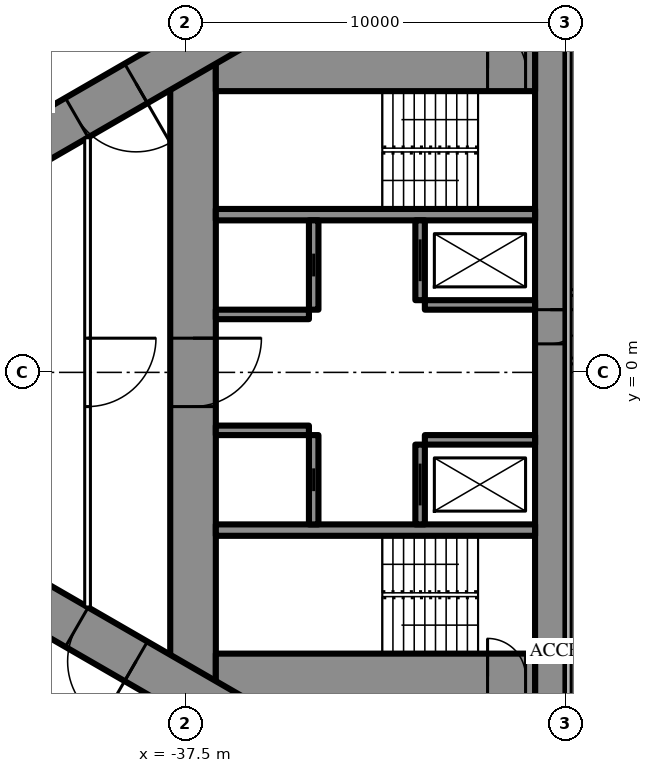
"""IFC4 building model, lengths in metres.
Left out: names, types, materials, properties, quantities, classifications, styles, units other than length and angle.
Written with IfcOpenShell. Run it as: python <this file> out.ifc"""

import sys

from ifc_helpers import new_model, si_unit, direction, frame, frame_2d, origin, place, context, subcontext, project, spatial, rectangle, extrude, element, fill, save


model = new_model("IFC4")
c1 = context("Model", 3, precision=1e-05, world=origin(), true_north=direction((0.0, 1.0)))
c2 = subcontext(c1, "Body", "Model", "MODEL_VIEW")
j1 = project(units=[si_unit("LENGTHUNIT", "METRE"), si_unit("PLANEANGLEUNIT", "RADIAN")], contexts=[c1])
p1 = place(None, origin())
s1 = spatial("IfcSite", under=j1, at=p1, CompositionType="ELEMENT")
p2 = place(p1, origin())
s2 = spatial("IfcBuilding", under=s1, at=p2, CompositionType="ELEMENT")
p3 = place(p2, frame((0.0, 0.0, 236.9)))
s3 = spatial("IfcBuildingStorey", under=s2, at=p3, CompositionType="ELEMENT", Elevation=236.9)
p4 = place(p3, frame((-27.9, 8.6, 0.0), z_axis=(0.0, 0.0, 1.0), x_axis=(0.0, -1.0, 0.0)))
e1 = element("IfcWall", 1, at=p4, inside=s3, PredefinedType="SHEAR", context=c2, shape_type="SweptSolid", body=[
    extrude(rectangle(XDim=17.2, YDim=0.8, at=frame_2d((8.6, 0.0))), origin(), (0.0, 0.0, 1.0), 3.6),
])
p5 = place(p4, frame((6.95, 0.0, 0.0)))
e2 = element("IfcOpeningElement", 2, at=p5, cuts=e1, PredefinedType="OPENING", context=c2, shape_type="SweptSolid", body=[
    extrude(rectangle(XDim=0.9, YDim=2.2, at=frame_2d((0.45, 1.1))), frame((0.0, 0.41, 0.0), z_axis=(0.0, -1.0, 0.0), x_axis=(1.0, 0.0, 0.0)), (0.0, 0.0, 1.0), 0.82),
])
p6 = place(p3, frame((-37.3, 8.6, 0.0), z_axis=(0.0, 0.0, 1.0), x_axis=(0.0, -1.0, 0.0)))
e3 = element("IfcWall", 3, at=p6, inside=s3, PredefinedType="SHEAR", context=c2, shape_type="SweptSolid", body=[
    extrude(rectangle(XDim=17.2, YDim=1.2, at=frame_2d((8.6, 0.0))), origin(), (0.0, 0.0, 1.0), 3.6),
])
p7 = place(p6, frame((7.7, 0.0, 0.0)))
e4 = element("IfcOpeningElement", 4, at=p7, cuts=e3, PredefinedType="OPENING", context=c2, shape_type="SweptSolid", body=[
    extrude(rectangle(XDim=1.8, YDim=2.2, at=frame_2d((0.9, 1.1))), frame((0.0, 0.61, 0.0), z_axis=(0.0, -1.0, 0.0), x_axis=(1.0, 0.0, 0.0)), (0.0, 0.0, 1.0), 1.22),
])
p8 = place(p3, frame((-28.3, 8.0, 0.0), z_axis=(0.0, 0.0, 1.0), x_axis=(-1.0, 0.0, 0.0)))
e5 = element("IfcWall", 5, at=p8, inside=s3, PredefinedType="SHEAR", context=c2, shape_type="SweptSolid", body=[
    extrude(rectangle(XDim=8.4, YDim=1.2, at=frame_2d((4.2, 0.0))), origin(), (0.0, 0.0, 1.0), 3.6),
])
p9 = place(p8, frame((0.25, 0.0, 0.0)))
e6 = element("IfcOpeningElement", 6, at=p9, cuts=e5, PredefinedType="OPENING", context=c2, shape_type="SweptSolid", body=[
    extrude(rectangle(XDim=1.0, YDim=2.2, at=frame_2d((0.5, 1.1))), frame((0.0, 0.61, 0.0), z_axis=(0.0, -1.0, 0.0), x_axis=(1.0, 0.0, 0.0)), (0.0, 0.0, 1.0), 1.22),
])
p10 = place(p3, frame((-28.3, -8.0, 0.0), z_axis=(0.0, 0.0, 1.0), x_axis=(-1.0, 0.0, 0.0)))
e7 = element("IfcWall", 7, at=p10, inside=s3, PredefinedType="SHEAR", context=c2, shape_type="SweptSolid", body=[
    extrude(rectangle(XDim=8.4, YDim=1.2, at=frame_2d((4.2, 0.0))), origin(), (0.0, 0.0, 1.0), 3.6),
])
p11 = place(p10, frame((0.25, 0.0, 0.0)))
e8 = element("IfcOpeningElement", 8, at=p11, cuts=e7, PredefinedType="OPENING", context=c2, shape_type="SweptSolid", body=[
    extrude(rectangle(XDim=1.0, YDim=2.2, at=frame_2d((0.5, 1.1))), frame((0.0, 0.61, 0.0), z_axis=(0.0, -1.0, 0.0), x_axis=(1.0, 0.0, 0.0)), (0.0, 0.0, 1.0), 1.22),
])
for number, where, z_axis, x_axis in (
    (9, (-28.3, 4.15, 0.0), (0.0, 0.0, 1.0), (-1.0, 0.0, 0.0)),
    (10, (-28.3, -4.15, 0.0), (0.0, 0.0, 1.0), (-1.0, 0.0, 0.0)),
):
    element("IfcWall", number, at=place(p3, frame(where, z_axis=z_axis, x_axis=x_axis)), inside=s3, PredefinedType="SHEAR", context=c2, shape_type="SweptSolid", body=[
        extrude(rectangle(XDim=8.4, YDim=0.3, at=frame_2d((4.2, 0.0))), origin(), (0.0, 0.0, 1.0), 3.6),
    ])
p12 = place(p3, frame((-31.325, 4.0, 0.0), z_axis=(0.0, 0.0, 1.0), x_axis=(0.0, -1.0, 0.0)))
e11 = element("IfcWall", 11, at=p12, inside=s3, PredefinedType="SHEAR", context=c2, shape_type="SweptSolid", body=[
    extrude(rectangle(XDim=2.1, YDim=0.25, at=frame_2d((1.05, 0.0))), origin(), (0.0, 0.0, 1.0), 3.6),
])
p13 = place(p12, frame((0.5, 0.0, 0.0)))
e12 = element("IfcOpeningElement", 12, at=p13, cuts=e11, PredefinedType="OPENING", context=c2, shape_type="SweptSolid", body=[
    extrude(rectangle(XDim=1.1, YDim=2.2, at=frame_2d((0.55, 1.1))), frame((0.0, 0.135, 0.0), z_axis=(0.0, -1.0, 0.0), x_axis=(1.0, 0.0, 0.0)), (0.0, 0.0, 1.0), 0.27),
])
p14 = place(p3, frame((-34.125, 4.0, 0.0), z_axis=(0.0, 0.0, 1.0), x_axis=(0.0, -1.0, 0.0)))
e13 = element("IfcWall", 13, at=p14, inside=s3, PredefinedType="SHEAR", context=c2, shape_type="SweptSolid", body=[
    extrude(rectangle(XDim=2.35, YDim=0.25, at=frame_2d((1.175, 0.0))), origin(), (0.0, 0.0, 1.0), 3.6),
])
p15 = place(p14, frame((0.875, 0.0, 0.0)))
e14 = element("IfcOpeningElement", 14, at=p15, cuts=e13, PredefinedType="OPENING", context=c2, shape_type="SweptSolid", body=[
    extrude(rectangle(XDim=0.6, YDim=2.0, at=frame_2d((0.3, 1.0))), frame((0.0, 0.135, 0.0), z_axis=(0.0, -1.0, 0.0), x_axis=(1.0, 0.0, 0.0)), (0.0, 0.0, 1.0), 0.27),
])
p16 = place(p3, frame((-28.3, 1.775, 0.0), z_axis=(0.0, 0.0, 1.0), x_axis=(-1.0, 0.0, 0.0)))
e15 = element("IfcWall", 15, at=p16, inside=s3, PredefinedType="SHEAR", context=c2, shape_type="SweptSolid", body=[
    extrude(rectangle(XDim=2.9, YDim=0.25, at=frame_2d((1.45, 0.0))), origin(), (0.0, 0.0, 1.0), 3.6),
])
p17 = place(p3, frame((-34.25, 1.525, 0.0), z_axis=(0.0, 0.0, 1.0), x_axis=(-1.0, 0.0, 0.0)))
e16 = element("IfcWall", 16, at=p17, inside=s3, PredefinedType="SHEAR", context=c2, shape_type="SweptSolid", body=[
    extrude(rectangle(XDim=2.45, YDim=0.25, at=frame_2d((1.225, 0.0))), origin(), (0.0, 0.0, 1.0), 3.6),
])
p18 = place(p3, frame((-31.325, -1.9, 0.0), z_axis=(0.0, 0.0, 1.0), x_axis=(0.0, -1.0, 0.0)))
e17 = element("IfcWall", 17, at=p18, inside=s3, PredefinedType="SHEAR", context=c2, shape_type="SweptSolid", body=[
    extrude(rectangle(XDim=2.1, YDim=0.25, at=frame_2d((1.05, 0.0))), origin(), (0.0, 0.0, 1.0), 3.6),
])
p19 = place(p18, frame((0.5, 0.0, 0.0)))
e18 = element("IfcOpeningElement", 18, at=p19, cuts=e17, PredefinedType="OPENING", context=c2, shape_type="SweptSolid", body=[
    extrude(rectangle(XDim=1.1, YDim=2.2, at=frame_2d((0.55, 1.1))), frame((0.0, 0.135, 0.0), z_axis=(0.0, -1.0, 0.0), x_axis=(1.0, 0.0, 0.0)), (0.0, 0.0, 1.0), 0.27),
])
p20 = place(p3, frame((-34.125, -1.65, 0.0), z_axis=(0.0, 0.0, 1.0), x_axis=(0.0, -1.0, 0.0)))
e19 = element("IfcWall", 19, at=p20, inside=s3, PredefinedType="SHEAR", context=c2, shape_type="SweptSolid", body=[
    extrude(rectangle(XDim=2.35, YDim=0.25, at=frame_2d((1.175, 0.0))), origin(), (0.0, 0.0, 1.0), 3.6),
])
p21 = place(p20, frame((0.875, 0.0, 0.0)))
e20 = element("IfcOpeningElement", 20, at=p21, cuts=e19, PredefinedType="OPENING", context=c2, shape_type="SweptSolid", body=[
    extrude(rectangle(XDim=0.6, YDim=2.0, at=frame_2d((0.3, 1.0))), frame((0.0, 0.135, 0.0), z_axis=(0.0, -1.0, 0.0), x_axis=(1.0, 0.0, 0.0)), (0.0, 0.0, 1.0), 0.27),
])
p22 = place(p3, frame((-28.3, -1.775, 0.0), z_axis=(0.0, 0.0, 1.0), x_axis=(-1.0, 0.0, 0.0)))
e21 = element("IfcWall", 21, at=p22, inside=s3, PredefinedType="SHEAR", context=c2, shape_type="SweptSolid", body=[
    extrude(rectangle(XDim=2.9, YDim=0.25, at=frame_2d((1.45, 0.0))), origin(), (0.0, 0.0, 1.0), 3.6),
])
p23 = place(p3, frame((-34.25, -1.525, 0.0), z_axis=(0.0, 0.0, 1.0), x_axis=(-1.0, 0.0, 0.0)))
e22 = element("IfcWall", 22, at=p23, inside=s3, PredefinedType="SHEAR", context=c2, shape_type="SweptSolid", body=[
    extrude(rectangle(XDim=2.45, YDim=0.25, at=frame_2d((1.225, 0.0))), origin(), (0.0, 0.0, 1.0), 3.6),
])
p24 = place(p3, frame((-27.2, 14.3, 0.0), z_axis=(0.0, 0.0, 1.0), x_axis=(-0.866026593062, -0.499997940104, 0.0)))
e23 = element("IfcWall", 23, at=p24, inside=s3, PredefinedType="SHEAR", context=c2, shape_type="SweptSolid", body=[
    extrude(rectangle(XDim=28.946, YDim=1.2, at=frame_2d((14.473, 0.0))), origin(), (0.0, 0.0, 1.0), 3.6),
])
p25 = place(p24, frame((4.6, 0.0, 0.0)))
e24 = element("IfcOpeningElement", 24, at=p25, cuts=e23, PredefinedType="OPENING", context=c2, shape_type="SweptSolid", body=[
    extrude(rectangle(XDim=1.0, YDim=2.2, at=frame_2d((0.5, 1.1))), frame((0.0, 0.61, 0.0), z_axis=(0.0, -1.0, 0.0), x_axis=(1.0, 0.0, 0.0)), (0.0, 0.0, 1.0), 1.22),
])
p26 = place(p24, frame((13.395, 0.0, 0.0)))
e25 = element("IfcOpeningElement", 25, at=p26, cuts=e23, PredefinedType="OPENING", context=c2, shape_type="SweptSolid", body=[
    extrude(rectangle(XDim=1.8, YDim=2.2, at=frame_2d((0.9, 1.1))), frame((0.0, 0.61, 0.0), z_axis=(0.0, -1.0, 0.0), x_axis=(1.0, 0.0, 0.0)), (0.0, 0.0, 1.0), 1.22),
])
p27 = place(p3, frame((-27.2, -14.3, 0.0), z_axis=(0.0, 0.0, 1.0), x_axis=(-0.866024021859, 0.500002393557, 0.0)))
e26 = element("IfcWall", 26, at=p27, inside=s3, PredefinedType="SHEAR", context=c2, shape_type="SweptSolid", body=[
    extrude(rectangle(XDim=27.907, YDim=1.2, at=frame_2d((13.954, 0.0))), origin(), (0.0, 0.0, 1.0), 3.6),
])
p28 = place(p27, frame((4.6, 0.0, 0.0)))
e27 = element("IfcOpeningElement", 27, at=p28, cuts=e26, PredefinedType="OPENING", context=c2, shape_type="SweptSolid", body=[
    extrude(rectangle(XDim=1.0, YDim=2.2, at=frame_2d((0.5, 1.1))), frame((0.0, 0.61, 0.0), z_axis=(0.0, -1.0, 0.0), x_axis=(1.0, 0.0, 0.0)), (0.0, 0.0, 1.0), 1.22),
])
p29 = place(p27, frame((13.395, 0.0, 0.0)))
e28 = element("IfcOpeningElement", 28, at=p29, cuts=e26, PredefinedType="OPENING", context=c2, shape_type="SweptSolid", body=[
    extrude(rectangle(XDim=1.8, YDim=2.2, at=frame_2d((0.9, 1.1))), frame((0.0, 0.61, 0.0), z_axis=(0.0, -1.0, 0.0), x_axis=(1.0, 0.0, 0.0)), (0.0, 0.0, 1.0), 1.22),
])
p30 = place(p3, frame((-28.737, 16.068, 0.0), z_axis=(0.0, 0.0, 1.0), x_axis=(-0.866026057212, -0.499998868229, 0.0)))
e29 = element("IfcWall", 29, at=p30, inside=s3, PredefinedType="PARTITIONING", context=c2, shape_type="SweptSolid", body=[
    extrude(rectangle(XDim=32.137, YDim=0.2, at=frame_2d((16.068, 0.0))), origin(), (0.0, 0.0, 1.0), 3.35),
])
p31 = place(p30, frame((1.08, 0.0, 0.0)))
e30 = element("IfcOpeningElement", 30, at=p31, cuts=e29, PredefinedType="OPENING", context=c2, shape_type="SweptSolid", body=[
    extrude(rectangle(XDim=1.8, YDim=2.03, at=frame_2d((0.9, 1.015))), frame((0.0, 0.11, 0.0), z_axis=(0.0, -1.0, 0.0), x_axis=(1.0, 0.0, 0.0)), (0.0, 0.0, 1.0), 0.22),
])
p32 = place(p30, frame((6.86, 0.0, 0.0)))
e31 = element("IfcOpeningElement", 31, at=p32, cuts=e29, PredefinedType="OPENING", context=c2, shape_type="SweptSolid", body=[
    extrude(rectangle(XDim=1.0, YDim=2.2, at=frame_2d((0.5, 1.1))), frame((0.0, 0.11, 0.0), z_axis=(0.0, -1.0, 0.0), x_axis=(1.0, 0.0, 0.0)), (0.0, 0.0, 1.0), 0.22),
])
p33 = place(p30, frame((16.418, 0.0, 0.0)))
e32 = element("IfcOpeningElement", 32, at=p33, cuts=e29, PredefinedType="OPENING", context=c2, shape_type="SweptSolid", body=[
    extrude(rectangle(XDim=0.95, YDim=2.2, at=frame_2d((0.475, 1.1))), frame((0.0, 0.11, 0.0), z_axis=(0.0, -1.0, 0.0), x_axis=(1.0, 0.0, 0.0)), (0.0, 0.0, 1.0), 0.22),
])
p34 = place(p30, frame((20.567, 0.0, 0.0)))
e33 = element("IfcOpeningElement", 33, at=p34, cuts=e29, PredefinedType="OPENING", context=c2, shape_type="SweptSolid", body=[
    extrude(rectangle(XDim=0.95, YDim=2.2, at=frame_2d((0.475, 1.1))), frame((0.0, 0.11, 0.0), z_axis=(0.0, -1.0, 0.0), x_axis=(1.0, 0.0, 0.0)), (0.0, 0.0, 1.0), 0.22),
])
p35 = place(p30, frame((27.065, 0.0, 0.0)))
e34 = element("IfcOpeningElement", 34, at=p35, cuts=e29, PredefinedType="OPENING", context=c2, shape_type="SweptSolid", body=[
    extrude(rectangle(XDim=0.95, YDim=2.2, at=frame_2d((0.475, 1.1))), frame((0.0, 0.11, 0.0), z_axis=(0.0, -1.0, 0.0), x_axis=(1.0, 0.0, 0.0)), (0.0, 0.0, 1.0), 0.22),
])
p36 = place(p3, frame((-40.075, 6.174, 0.0), z_axis=(0.0, 0.0, 1.0), x_axis=(0.0, -1.0, 0.0)))
e35 = element("IfcWall", 35, at=p36, inside=s3, PredefinedType="PARTITIONING", context=c2, shape_type="SweptSolid", body=[
    extrude(rectangle(XDim=12.348, YDim=0.15, at=frame_2d((6.174, 0.0))), origin(), (0.0, 0.0, 1.0), 3.35),
])
p37 = place(p36, frame((5.274, 0.0, 0.0)))
e36 = element("IfcOpeningElement", 36, at=p37, cuts=e35, PredefinedType="OPENING", context=c2, shape_type="SweptSolid", body=[
    extrude(rectangle(XDim=1.8, YDim=2.2, at=frame_2d((0.9, 1.1))), frame((0.0, 0.085, 0.0), z_axis=(0.0, -1.0, 0.0), x_axis=(1.0, 0.0, 0.0)), (0.0, 0.0, 1.0), 0.17),
])
p38 = place(p3, frame((-27.5, 0.3, 0.0), z_axis=(0.0, 0.0, 1.0), x_axis=(1.0, 0.0, 0.0)))
e37 = element("IfcWall", 37, at=p38, inside=s3, PredefinedType="PARTITIONING", context=c2, shape_type="SweptSolid", body=[
    extrude(rectangle(XDim=55.0, YDim=0.15, at=frame_2d((27.5, 0.0))), origin(), (0.0, 0.0, 1.0), 2.4),
])
p39 = place(p38, frame((1.575, 0.0, 0.0)))
e38 = element("IfcOpeningElement", 38, at=p39, cuts=e37, PredefinedType="OPENING", context=c2, shape_type="SweptSolid", body=[
    extrude(rectangle(XDim=1.0, YDim=2.2, at=frame_2d((0.5, 1.1))), frame((0.0, 0.085, 0.0), z_axis=(0.0, -1.0, 0.0), x_axis=(1.0, 0.0, 0.0)), (0.0, 0.0, 1.0), 0.17),
])
p40 = place(p38, frame((8.525, 0.0, 0.0)))
e39 = element("IfcOpeningElement", 39, at=p40, cuts=e37, PredefinedType="OPENING", context=c2, shape_type="SweptSolid", body=[
    extrude(rectangle(XDim=1.05, YDim=2.4, at=frame_2d((0.525, 1.2))), frame((0.0, 0.085, 0.0), z_axis=(0.0, -1.0, 0.0), x_axis=(1.0, 0.0, 0.0)), (0.0, 0.0, 1.0), 0.17),
])
p41 = place(p38, frame((14.025, 0.0, 0.0)))
e40 = element("IfcOpeningElement", 40, at=p41, cuts=e37, PredefinedType="OPENING", context=c2, shape_type="SweptSolid", body=[
    extrude(rectangle(XDim=1.05, YDim=2.4, at=frame_2d((0.525, 1.2))), frame((0.0, 0.085, 0.0), z_axis=(0.0, -1.0, 0.0), x_axis=(1.0, 0.0, 0.0)), (0.0, 0.0, 1.0), 0.17),
])
p42 = place(p38, frame((25.025, 0.0, 0.0)))
e41 = element("IfcOpeningElement", 41, at=p42, cuts=e37, PredefinedType="OPENING", context=c2, shape_type="SweptSolid", body=[
    extrude(rectangle(XDim=1.05, YDim=2.4, at=frame_2d((0.525, 1.2))), frame((0.0, 0.085, 0.0), z_axis=(0.0, -1.0, 0.0), x_axis=(1.0, 0.0, 0.0)), (0.0, 0.0, 1.0), 0.17),
])
p43 = place(p38, frame((30.525, 0.0, 0.0)))
e42 = element("IfcOpeningElement", 42, at=p43, cuts=e37, PredefinedType="OPENING", context=c2, shape_type="SweptSolid", body=[
    extrude(rectangle(XDim=1.05, YDim=2.4, at=frame_2d((0.525, 1.2))), frame((0.0, 0.085, 0.0), z_axis=(0.0, -1.0, 0.0), x_axis=(1.0, 0.0, 0.0)), (0.0, 0.0, 1.0), 0.17),
])
p44 = place(p38, frame((41.525, 0.0, 0.0)))
e43 = element("IfcOpeningElement", 43, at=p44, cuts=e37, PredefinedType="OPENING", context=c2, shape_type="SweptSolid", body=[
    extrude(rectangle(XDim=1.05, YDim=2.4, at=frame_2d((0.525, 1.2))), frame((0.0, 0.085, 0.0), z_axis=(0.0, -1.0, 0.0), x_axis=(1.0, 0.0, 0.0)), (0.0, 0.0, 1.0), 0.17),
])
p45 = place(p38, frame((47.025, 0.0, 0.0)))
e44 = element("IfcOpeningElement", 44, at=p45, cuts=e37, PredefinedType="OPENING", context=c2, shape_type="SweptSolid", body=[
    extrude(rectangle(XDim=1.05, YDim=2.4, at=frame_2d((0.525, 1.2))), frame((0.0, 0.085, 0.0), z_axis=(0.0, -1.0, 0.0), x_axis=(1.0, 0.0, 0.0)), (0.0, 0.0, 1.0), 0.17),
])
p46 = place(p38, frame((52.525, 0.0, 0.0)))
e45 = element("IfcOpeningElement", 45, at=p46, cuts=e37, PredefinedType="OPENING", context=c2, shape_type="SweptSolid", body=[
    extrude(rectangle(XDim=1.05, YDim=2.4, at=frame_2d((0.525, 1.2))), frame((0.0, 0.085, 0.0), z_axis=(0.0, -1.0, 0.0), x_axis=(1.0, 0.0, 0.0)), (0.0, 0.0, 1.0), 0.17),
])
p47 = place(p3, frame((-27.5, 2.1, 0.0), z_axis=(0.0, 0.0, 1.0), x_axis=(1.0, 0.0, 0.0)))
e46 = element("IfcWall", 46, at=p47, inside=s3, PredefinedType="PARTITIONING", context=c2, shape_type="SweptSolid", body=[
    extrude(rectangle(XDim=5.85, YDim=0.15, at=frame_2d((2.925, 0.0))), origin(), (0.0, 0.0, 1.0), 3.4),
])
p48 = place(p47, frame((2.025, 0.0, 0.0)))
e47 = element("IfcOpeningElement", 47, at=p48, cuts=e46, PredefinedType="OPENING", context=c2, shape_type="SweptSolid", body=[
    extrude(rectangle(XDim=1.05, YDim=2.4, at=frame_2d((0.525, 1.2))), frame((0.0, 0.085, 0.0), z_axis=(0.0, -1.0, 0.0), x_axis=(1.0, 0.0, 0.0)), (0.0, 0.0, 1.0), 0.17),
])
p49 = place(p3, frame((-39.758, -11.697, 0.0), z_axis=(0.0, 0.0, 1.0), x_axis=(-0.866024194504, 0.500002094529, 0.0)))
e48 = element("IfcWall", 48, at=p49, inside=s3, PredefinedType="PARTITIONING", context=c2, shape_type="SweptSolid", body=[
    extrude(rectangle(XDim=6.6, YDim=0.25, at=frame_2d((3.3, 0.0))), origin(), (0.0, 0.0, 1.0), 3.35),
])
p50 = place(p49, frame((0.75, 0.0, 0.0)))
e49 = element("IfcOpeningElement", 49, at=p50, cuts=e48, PredefinedType="OPENING", context=c2, shape_type="SweptSolid", body=[
    extrude(rectangle(XDim=1.1, YDim=2.2, at=frame_2d((0.55, 1.1))), frame((0.0, 0.135, 0.0), z_axis=(0.0, -1.0, 0.0), x_axis=(1.0, 0.0, 0.0)), (0.0, 0.0, 1.0), 0.27),
])
p51 = place(p49, frame((2.75, 0.0, 0.0)))
e50 = element("IfcOpeningElement", 50, at=p51, cuts=e48, PredefinedType="OPENING", context=c2, shape_type="SweptSolid", body=[
    extrude(rectangle(XDim=1.1, YDim=2.2, at=frame_2d((0.55, 1.1))), frame((0.0, 0.135, 0.0), z_axis=(0.0, -1.0, 0.0), x_axis=(1.0, 0.0, 0.0)), (0.0, 0.0, 1.0), 0.27),
])
p52 = place(p49, frame((4.75, 0.0, 0.0)))
e51 = element("IfcOpeningElement", 51, at=p52, cuts=e48, PredefinedType="OPENING", context=c2, shape_type="SweptSolid", body=[
    extrude(rectangle(XDim=1.1, YDim=2.2, at=frame_2d((0.55, 1.1))), frame((0.0, 0.135, 0.0), z_axis=(0.0, -1.0, 0.0), x_axis=(1.0, 0.0, 0.0)), (0.0, 0.0, 1.0), 0.27),
])
p53 = place(p37, origin())
e52 = element("IfcDoor", 52, at=p53, inside=s3, OperationType="DOUBLE_DOOR_SINGLE_SWING", PredefinedType="DOOR", context=c2, shape_type="SweptSolid", body=[
    extrude(rectangle(XDim=1.8, YDim=2.2, at=frame_2d((0.9, 1.1))), frame((0.0, 0.025, 0.0), z_axis=(0.0, -1.0, 0.0), x_axis=(1.0, 0.0, 0.0)), (0.0, 0.0, 1.0), 0.05),
])
fill(e36, e52)
p54 = place(p26, origin())
e53 = element("IfcDoor", 53, at=p54, inside=s3, OperationType="DOUBLE_DOOR_SINGLE_SWING", PredefinedType="DOOR", context=c2, shape_type="SweptSolid", body=[
    extrude(rectangle(XDim=1.8, YDim=2.2, at=frame_2d((0.9, 1.1))), frame((0.0, 0.025, 0.0), z_axis=(0.0, -1.0, 0.0), x_axis=(1.0, 0.0, 0.0)), (0.0, 0.0, 1.0), 0.05),
])
fill(e25, e53)
p55 = place(p29, origin())
e54 = element("IfcDoor", 54, at=p55, inside=s3, OperationType="DOUBLE_DOOR_SINGLE_SWING", PredefinedType="DOOR", context=c2, shape_type="SweptSolid", body=[
    extrude(rectangle(XDim=1.8, YDim=2.2, at=frame_2d((0.9, 1.1))), frame((0.0, 0.025, 0.0), z_axis=(0.0, -1.0, 0.0), x_axis=(1.0, 0.0, 0.0)), (0.0, 0.0, 1.0), 0.05),
])
fill(e28, e54)
p56 = place(p7, origin())
e55 = element("IfcDoor", 55, at=p56, inside=s3, OperationType="DOUBLE_DOOR_SINGLE_SWING", PredefinedType="DOOR", context=c2, shape_type="SweptSolid", body=[
    extrude(rectangle(XDim=1.8, YDim=2.2, at=frame_2d((0.9, 1.1))), frame((0.0, 0.025, 0.0), z_axis=(0.0, -1.0, 0.0), x_axis=(1.0, 0.0, 0.0)), (0.0, 0.0, 1.0), 0.05),
])
fill(e4, e55)
p57 = place(p9, origin())
e56 = element("IfcDoor", 56, at=p57, inside=s3, OperationType="SINGLE_SWING_RIGHT", PredefinedType="DOOR", context=c2, shape_type="SweptSolid", body=[
    extrude(rectangle(XDim=1.0, YDim=2.2, at=frame_2d((0.5, 1.1))), frame((0.0, 0.025, 0.0), z_axis=(0.0, -1.0, 0.0), x_axis=(1.0, 0.0, 0.0)), (0.0, 0.0, 1.0), 0.05),
])
fill(e6, e56)
p58 = place(p11, origin())
e57 = element("IfcDoor", 57, at=p58, inside=s3, OperationType="SINGLE_SWING_RIGHT", PredefinedType="DOOR", context=c2, shape_type="SweptSolid", body=[
    extrude(rectangle(XDim=1.0, YDim=2.2, at=frame_2d((0.5, 1.1))), frame((0.0, 0.025, 0.0), z_axis=(0.0, -1.0, 0.0), x_axis=(1.0, 0.0, 0.0)), (0.0, 0.0, 1.0), 0.05),
])
fill(e8, e57)
p59 = place(p5, origin())
e58 = element("IfcDoor", 58, at=p59, inside=s3, OperationType="SINGLE_SWING_LEFT", PredefinedType="DOOR", context=c2, shape_type="SweptSolid", body=[
    extrude(rectangle(XDim=0.9, YDim=2.2, at=frame_2d((0.45, 1.1))), frame((0.0, 0.025, 0.0), z_axis=(0.0, -1.0, 0.0), x_axis=(1.0, 0.0, 0.0)), (0.0, 0.0, 1.0), 0.05),
])
fill(e2, e58)
p60 = place(p13, origin())
e59 = element("IfcDoor", 59, at=p60, inside=s3, OperationType="SLIDING_TO_LEFT", PredefinedType="USERDEFINED", context=c2, shape_type="SweptSolid", body=[
    extrude(rectangle(XDim=1.1, YDim=2.2, at=frame_2d((0.55, 1.1))), frame((0.0, 0.025, 0.0), z_axis=(0.0, -1.0, 0.0), x_axis=(1.0, 0.0, 0.0)), (0.0, 0.0, 1.0), 0.05),
])
fill(e12, e59)
p61 = place(p19, origin())
e60 = element("IfcDoor", 60, at=p61, inside=s3, OperationType="SLIDING_TO_LEFT", PredefinedType="USERDEFINED", context=c2, shape_type="SweptSolid", body=[
    extrude(rectangle(XDim=1.1, YDim=2.2, at=frame_2d((0.55, 1.1))), frame((0.0, 0.025, 0.0), z_axis=(0.0, -1.0, 0.0), x_axis=(1.0, 0.0, 0.0)), (0.0, 0.0, 1.0), 0.05),
])
fill(e18, e60)
p62 = place(p15, origin())
e61 = element("IfcDoor", 61, at=p62, inside=s3, OperationType="SLIDING_TO_LEFT", PredefinedType="DOOR", context=c2, shape_type="SweptSolid", body=[
    extrude(rectangle(XDim=0.6, YDim=2.0, at=frame_2d((0.3, 1.0))), frame((0.0, 0.025, 0.0), z_axis=(0.0, -1.0, 0.0), x_axis=(1.0, 0.0, 0.0)), (0.0, 0.0, 1.0), 0.05),
])
fill(e14, e61)
p63 = place(p21, origin())
e62 = element("IfcDoor", 62, at=p63, inside=s3, OperationType="SLIDING_TO_LEFT", PredefinedType="DOOR", context=c2, shape_type="SweptSolid", body=[
    extrude(rectangle(XDim=0.6, YDim=2.0, at=frame_2d((0.3, 1.0))), frame((0.0, 0.025, 0.0), z_axis=(0.0, -1.0, 0.0), x_axis=(1.0, 0.0, 0.0)), (0.0, 0.0, 1.0), 0.05),
])
fill(e20, e62)
save(model, sys.argv[1])
